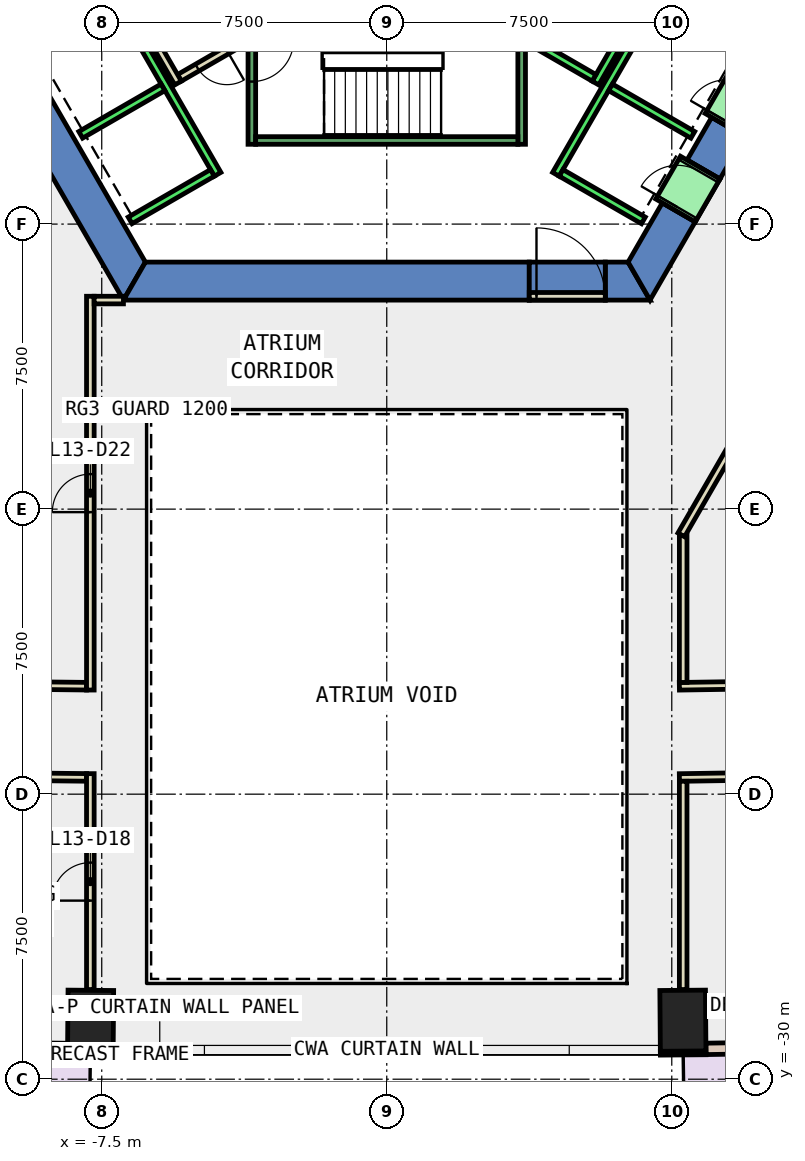
"""IFC4 building model, lengths in metres.
Left out: names, types, materials, properties, quantities, classifications, styles, units other than length and angle.
Written with IfcOpenShell. Run it as: python <this file> out.ifc"""

import sys

from ifc_helpers import new_model, si_unit, direction, frame, frame_2d, origin, origin_2d, place, context, subcontext, project, spatial, polyline, rectangle, outline, extrude, element, fill, save


model = new_model("IFC4")
c1 = context("Model", 3, precision=1e-05, world=origin(), true_north=direction((0.0, 1.0)))
c2 = subcontext(c1, "Body", "Model", "MODEL_VIEW")
j1 = project(units=[si_unit("LENGTHUNIT", "METRE"), si_unit("PLANEANGLEUNIT", "RADIAN")], contexts=[c1])
p1 = place(None, origin())
s1 = spatial("IfcSite", under=j1, at=p1, CompositionType="ELEMENT")
p2 = place(p1, origin())
s2 = spatial("IfcBuilding", under=s1, at=p2, CompositionType="ELEMENT")
p3 = place(p2, frame((0.0, 0.0, 64.4)))
s3 = spatial("IfcBuildingStorey", under=s2, at=p3, CompositionType="ELEMENT", Elevation=64.4)
for number, where, z_axis, x_axis in (
    (1, (-7.793, -28.461, -0.4), (0.0, 0.0, 1.0), (-1.0, 0.008, 0.0)),
    (2, (7.793, -28.461, -0.4), (0.0, 0.0, 1.0), (1.0, 0.008, 0.0)),
):
    element("IfcColumn", number, at=place(p3, frame(where, z_axis=z_axis, x_axis=x_axis)), inside=s3, PredefinedType="COLUMN", context=c2, shape_type="SweptSolid", body=[
        extrude(rectangle(XDim=1.2, YDim=1.6, at=origin_2d()), origin(), (0.0, 0.0, 1.0), 4.2),
    ])
p4 = place(p3, frame((0.0, 0.0, -0.4)))
e3 = element("IfcWall", 3, at=p4, inside=s3, PredefinedType="SHEAR", context=c2, shape_type="SweptSolid", body=[
    extrude(outline(polyline([(-13.856, 2.5), (-6.928, -9.5), (-6.351, -8.5), (-12.702, 2.5), (-13.856, 2.5)])), origin(), (0.0, 0.0, 1.0), 4.2),
])
p5 = place(p3, frame((0.0, 0.0, -0.4)))
e4 = element("IfcWall", 4, at=p5, inside=s3, PredefinedType="SHEAR", context=c2, shape_type="SweptSolid", body=[
    extrude(outline(polyline([(3.75, -9.5), (3.75, -8.5), (-6.351, -8.5), (-6.928, -9.5), (3.75, -9.5)])), origin(), (0.0, 0.0, 1.0), 4.2),
])
p6 = place(p3, frame((0.0, 0.0, -0.4)))
e5 = element("IfcWall", 5, at=p6, inside=s3, PredefinedType="SHEAR", context=c2, shape_type="SweptSolid", body=[
    extrude(outline(polyline([(5.75, -8.5), (5.75, -9.5), (6.928, -9.5), (6.351, -8.5), (5.75, -8.5)])), origin(), (0.0, 0.0, 1.0), 4.2),
])
p7 = place(p3, frame((0.0, 0.0, 3.6)))
e6 = element("IfcWall", 6, at=p7, inside=s3, PredefinedType="SHEAR", context=c2, shape_type="SweptSolid", body=[
    extrude(outline(polyline([(5.75, -9.5), (5.75, -8.5), (3.75, -8.5), (3.75, -9.5), (5.75, -9.5)])), origin(), (0.0, 0.0, 1.0), 0.2),
])
p8 = place(p3, frame((0.0, 0.0, -0.4)))
e7 = element("IfcWall", 7, at=p8, inside=s3, PredefinedType="SHEAR", context=c2, shape_type="SweptSolid", body=[
    extrude(outline(polyline([(8.117, -7.44), (7.252, -6.94), (6.351, -8.5), (6.928, -9.5), (8.117, -7.44)])), origin(), (0.0, 0.0, 1.0), 4.2),
])
p9 = place(p3, frame((0.0, 0.0, -0.4)))
e8 = element("IfcWall", 8, at=p9, inside=s3, PredefinedType="SHEAR", context=c2, shape_type="SweptSolid", body=[
    extrude(outline(polyline([(9.417, -5.189), (8.551, -4.689), (7.902, -5.814), (8.767, -6.314), (9.417, -5.189)])), origin(), (0.0, 0.0, 1.0), 4.2),
])
p10 = place(p3, frame((0.0, 0.0, 3.6)))
e9 = element("IfcWall", 9, at=p10, inside=s3, PredefinedType="SHEAR", context=c2, shape_type="SweptSolid", body=[
    extrude(outline(polyline([(8.767, -6.314), (7.902, -5.814), (7.252, -6.94), (8.117, -7.44), (8.767, -6.314)])), origin(), (0.0, 0.0, 1.0), 0.2),
])
p11 = place(p3, frame((0.0, 0.0, 3.6)))
e10 = element("IfcWall", 10, at=p11, inside=s3, PredefinedType="SHEAR", context=c2, shape_type="SweptSolid", body=[
    extrude(outline(polyline([(10.067, -4.063), (9.201, -3.563), (8.551, -4.689), (9.417, -5.189), (10.067, -4.063)])), origin(), (0.0, 0.0, 1.0), 0.2),
])
for number, where, z_axis, x_axis in (
    (11, (-8.4, -29.306, 0.0), (0.0, 0.0, 1.0), (1.0, -0.008, 0.0)),
    (12, (7.2, -29.316, 0.0), (0.0, 0.0, 1.0), (1.0, 0.008, 0.0)),
):
    element("IfcWall", number, at=place(p3, frame(where, z_axis=z_axis, x_axis=x_axis)), inside=s3, PredefinedType="STANDARD", context=c2, shape_type="SweptSolid", body=[
        extrude(rectangle(XDim=1.2, YDim=0.1, at=frame_2d((0.6, 0.0))), origin(), (0.0, 0.0, 1.0), 3.8),
    ])
p12 = place(p3, frame((-15.568, -29.125, 0.0), z_axis=(0.0, 0.0, 1.0), x_axis=(0.999939152594, -0.011031369316, 0.0)))
e13 = element("IfcWall", 13, at=p12, inside=s3, PredefinedType="STANDARD", context=c2, shape_type="SweptSolid", body=[
    extrude(rectangle(XDim=7.171, YDim=0.3, at=frame_2d((3.585, 0.0))), origin(), (0.0, 0.0, 1.0), 3.8),
])
p13 = place(p12, frame((0.793, 0.0, 0.0)))
e14 = element("IfcOpeningElement", 14, at=p13, cuts=e13, PredefinedType="OPENING", context=c2, shape_type="SweptSolid", body=[
    extrude(rectangle(XDim=2.0, YDim=2.4, at=frame_2d((1.0, 1.2))), frame((0.0, 0.16, 0.0), z_axis=(0.0, -1.0, 0.0), x_axis=(1.0, 0.0, 0.0)), (0.0, 0.0, 1.0), 0.32),
])
p14 = place(p12, frame((4.178, 0.0, 0.9)))
e15 = element("IfcOpeningElement", 15, at=p14, cuts=e13, PredefinedType="OPENING", context=c2, shape_type="SweptSolid", body=[
    extrude(rectangle(XDim=2.4, YDim=2.6, at=frame_2d((1.2, 1.3))), frame((0.0, 0.16, 0.0), z_axis=(0.0, -1.0, 0.0), x_axis=(1.0, 0.0, 0.0)), (0.0, 0.0, 1.0), 0.32),
])
p15 = place(p3, frame((8.398, -29.202, 0.0), z_axis=(0.0, 0.0, 1.0), x_axis=(0.99988053916, 0.015456629942, 0.0)))
e16 = element("IfcWall", 16, at=p15, inside=s3, PredefinedType="STANDARD", context=c2, shape_type="SweptSolid", body=[
    extrude(rectangle(XDim=7.171, YDim=0.3, at=frame_2d((3.585, 0.0))), origin(), (0.0, 0.0, 1.0), 3.8),
])
p16 = place(p15, frame((0.793, 0.0, 0.0)))
e17 = element("IfcOpeningElement", 17, at=p16, cuts=e16, PredefinedType="OPENING", context=c2, shape_type="SweptSolid", body=[
    extrude(rectangle(XDim=2.0, YDim=2.4, at=frame_2d((1.0, 1.2))), frame((0.0, 0.16, 0.0), z_axis=(0.0, -1.0, 0.0), x_axis=(1.0, 0.0, 0.0)), (0.0, 0.0, 1.0), 0.32),
])
p17 = place(p15, frame((4.178, 0.0, 0.9)))
e18 = element("IfcOpeningElement", 18, at=p17, cuts=e16, PredefinedType="OPENING", context=c2, shape_type="SweptSolid", body=[
    extrude(rectangle(XDim=2.4, YDim=2.6, at=frame_2d((1.2, 1.3))), frame((0.0, 0.16, 0.0), z_axis=(0.0, -1.0, 0.0), x_axis=(1.0, 0.0, 0.0)), (0.0, 0.0, 1.0), 0.32),
])
p18 = place(p3, frame((7.7, -19.661, 0.0), z_axis=(0.0, 0.0, 1.0), x_axis=(0.999882138464, 0.015352823245, 0.0)))
e19 = element("IfcWall", 19, at=p18, inside=s3, PredefinedType="PARTITIONING", context=c2, shape_type="SweptSolid", body=[
    extrude(rectangle(XDim=8.269, YDim=0.2, at=frame_2d((4.135, 0.0))), origin(), (0.0, 0.0, 1.0), 3.8),
])
p19 = place(p18, frame((3.235, 0.0, 0.0)))
e20 = element("IfcOpeningElement", 20, at=p19, cuts=e19, PredefinedType="OPENING", context=c2, shape_type="SweptSolid", body=[
    extrude(rectangle(XDim=1.8, YDim=2.1, at=frame_2d((0.9, 1.05))), frame((0.0, 0.11, 0.0), z_axis=(0.0, -1.0, 0.0), x_axis=(1.0, 0.0, 0.0)), (0.0, 0.0, 1.0), 0.22),
])
p20 = place(p3, frame((-9.776, -19.638, 0.0), z_axis=(0.0, 0.0, 1.0), x_axis=(0.999937374473, -0.011191386544, 0.0)))
e21 = element("IfcWall", 21, at=p20, inside=s3, PredefinedType="PARTITIONING", context=c2, shape_type="SweptSolid", body=[
    extrude(rectangle(XDim=1.876, YDim=0.2, at=frame_2d((0.938, 0.0))), origin(), (0.0, 0.0, 1.0), 3.8),
])
p21 = place(p3, frame((16.018, -21.933, 0.0), z_axis=(0.0, 0.0, 1.0), x_axis=(-0.999879942341, -0.015495189738, 0.0)))
e22 = element("IfcWall", 22, at=p21, inside=s3, PredefinedType="PARTITIONING", context=c2, shape_type="SweptSolid", body=[
    extrude(rectangle(XDim=8.319, YDim=0.2, at=frame_2d((4.16, 0.0))), origin(), (0.0, 0.0, 1.0), 3.8),
])
p22 = place(p21, frame((3.66, 0.0, 0.0)))
e23 = element("IfcOpeningElement", 23, at=p22, cuts=e22, PredefinedType="OPENING", context=c2, shape_type="SweptSolid", body=[
    extrude(rectangle(XDim=1.0, YDim=2.1, at=frame_2d((0.5, 1.05))), frame((0.0, 0.11, 0.0), z_axis=(0.0, -1.0, 0.0), x_axis=(1.0, 0.0, 0.0)), (0.0, 0.0, 1.0), 0.22),
])
p23 = place(p3, frame((-7.9, -22.059, 0.0), z_axis=(0.0, 0.0, 1.0), x_axis=(-0.999940210022, 0.010935098606, 0.0)))
e24 = element("IfcWall", 24, at=p23, inside=s3, PredefinedType="PARTITIONING", context=c2, shape_type="SweptSolid", body=[
    extrude(rectangle(XDim=3.929, YDim=0.2, at=frame_2d((1.965, 0.0))), origin(), (0.0, 0.0, 1.0), 3.8),
])
p24 = place(p3, frame((-3.65, -2.61, 0.0), z_axis=(0.0, 0.0, 1.0), x_axis=(-0.866072462134, -0.499918483688, 0.0)))
e25 = element("IfcWall", 25, at=p24, inside=s3, PredefinedType="PARTITIONING", context=c2, shape_type="SweptSolid", body=[
    extrude(rectangle(XDim=2.084, YDim=0.2, at=frame_2d((1.042, 0.0))), origin(), (0.0, 0.0, 1.0), 3.8),
])
p25 = place(p24, frame((0.642, 0.0, 0.0)))
e26 = element("IfcOpeningElement", 26, at=p25, cuts=e25, PredefinedType="OPENING", context=c2, shape_type="SweptSolid", body=[
    extrude(rectangle(XDim=0.9, YDim=2.1, at=frame_2d((0.45, 1.05))), frame((0.0, 0.11, 0.0), z_axis=(0.0, -1.0, 0.0), x_axis=(1.0, 0.0, 0.0)), (0.0, 0.0, 1.0), 0.22),
])
p26 = place(p3, frame((-5.492, -3.788, 0.0), z_axis=(0.0, 0.0, 1.0), x_axis=(-0.500008949224, 0.866020236886, 0.0)))
e27 = element("IfcWall", 27, at=p26, inside=s3, PredefinedType="PARTITIONING", context=c2, shape_type="SweptSolid", body=[
    extrude(rectangle(XDim=2.68, YDim=0.2, at=frame_2d((1.34, 0.0))), origin(), (0.0, 0.0, 1.0), 3.8),
])
p27 = place(p3, frame((7.8, -15.69, 0.0), z_axis=(0.0, 0.0, 1.0), x_axis=(0.0, -1.0, 0.0)))
e28 = element("IfcWall", 28, at=p27, inside=s3, PredefinedType="PARTITIONING", context=c2, shape_type="SweptSolid", body=[
    extrude(rectangle(XDim=3.87, YDim=0.2, at=frame_2d((1.935, 0.0))), origin(), (0.0, 0.0, 1.0), 3.8),
])
p28 = place(p3, frame((-7.8, -19.76, 0.0), z_axis=(0.0, 0.0, 1.0), x_axis=(0.0, 1.0, 0.0)))
e29 = element("IfcWall", 29, at=p28, inside=s3, PredefinedType="PARTITIONING", context=c2, shape_type="SweptSolid", body=[
    extrude(rectangle(XDim=10.361, YDim=0.2, at=frame_2d((5.181, 0.0))), origin(), (0.0, 0.0, 1.0), 3.8),
])
p29 = place(p28, frame((4.681, 0.0, 0.0)))
e30 = element("IfcOpeningElement", 30, at=p29, cuts=e29, PredefinedType="OPENING", context=c2, shape_type="SweptSolid", body=[
    extrude(rectangle(XDim=1.0, YDim=2.1, at=frame_2d((0.5, 1.05))), frame((0.0, 0.11, 0.0), z_axis=(0.0, -1.0, 0.0), x_axis=(1.0, 0.0, 0.0)), (0.0, 0.0, 1.0), 0.22),
])
p30 = place(p3, frame((-7.7, -9.499, 0.0), z_axis=(0.0, 0.0, 1.0), x_axis=(1.0, 0.0, 0.0)))
e31 = element("IfcWall", 31, at=p30, inside=s3, PredefinedType="PARTITIONING", context=c2, shape_type="SweptSolid", body=[
    extrude(rectangle(XDim=0.771, YDim=0.2, at=frame_2d((0.385, 0.0))), origin(), (0.0, 0.0, 1.0), 3.8),
])
p31 = place(p3, frame((7.8, -22.16, 0.0), z_axis=(0.0, 0.0, 1.0), x_axis=(0.0, -1.0, 0.0)))
e32 = element("IfcWall", 32, at=p31, inside=s3, PredefinedType="PARTITIONING", context=c2, shape_type="SweptSolid", body=[
    extrude(rectangle(XDim=5.481, YDim=0.2, at=frame_2d((2.741, 0.0))), origin(), (0.0, 0.0, 1.0), 3.8),
])
p32 = place(p3, frame((-7.8, -27.641, 0.0), z_axis=(0.0, 0.0, 1.0), x_axis=(0.0, 1.0, 0.0)))
e33 = element("IfcWall", 33, at=p32, inside=s3, PredefinedType="PARTITIONING", context=c2, shape_type="SweptSolid", body=[
    extrude(rectangle(XDim=5.681, YDim=0.2, at=frame_2d((2.841, 0.0))), origin(), (0.0, 0.0, 1.0), 3.8),
])
p33 = place(p32, frame((2.34, 0.0, 0.0)))
e34 = element("IfcOpeningElement", 34, at=p33, cuts=e33, PredefinedType="OPENING", context=c2, shape_type="SweptSolid", body=[
    extrude(rectangle(XDim=1.0, YDim=2.1, at=frame_2d((0.5, 1.05))), frame((0.0, 0.11, 0.0), z_axis=(0.0, -1.0, 0.0), x_axis=(1.0, 0.0, 0.0)), (0.0, 0.0, 1.0), 0.22),
])
p34 = place(p3, frame((3.75, -9.4, 0.0), z_axis=(0.0, 0.0, 1.0), x_axis=(1.0, 0.0, 0.0)))
e35 = element("IfcWall", 35, at=p34, inside=s3, PredefinedType="PARTITIONING", context=c2, shape_type="SweptSolid", body=[
    extrude(rectangle(XDim=2.0, YDim=0.2, at=frame_2d((1.0, 0.0))), origin(), (0.0, 0.0, 1.0), 2.4),
])
p35 = place(p34, frame((0.19, 0.0, 0.0)))
e36 = element("IfcOpeningElement", 36, at=p35, cuts=e35, PredefinedType="OPENING", context=c2, shape_type="SweptSolid", body=[
    extrude(rectangle(XDim=1.8, YDim=2.1, at=frame_2d((0.9, 1.05))), frame((0.0, 0.11, 0.0), z_axis=(0.0, -1.0, 0.0), x_axis=(1.0, 0.0, 0.0)), (0.0, 0.0, 1.0), 0.22),
])
p36 = place(p3, frame((12.401, -7.622, 0.0), z_axis=(0.0, 0.0, 1.0), x_axis=(-0.500029185841, -0.866008552675, 0.0)))
e37 = element("IfcWall", 37, at=p36, inside=s3, PredefinedType="PARTITIONING", context=c2, shape_type="SweptSolid", body=[
    extrude(rectangle(XDim=9.301, YDim=0.2, at=frame_2d((4.651, 0.0))), origin(), (0.0, 0.0, 1.0), 3.8),
])
p37 = place(p3, frame((-9.751, 2.99, 0.0), z_axis=(0.0, 0.0, 1.0), x_axis=(0.50000090737, -0.866024879913, 0.0)))
e38 = element("IfcWall", 38, at=p37, inside=s3, PredefinedType="STANDARD", context=c2, shape_type="SweptSolid", body=[
    extrude(rectangle(XDim=10.6, YDim=0.2, at=frame_2d((5.3, 0.0))), origin(), (0.0, 0.0, 1.0), 3.8),
])
for number, where, z_axis, x_axis in (
    (39, (-5.888, -3.902, 0.0), (0.0, 0.0, 1.0), (-0.866, -0.5, 0.0)),
    (40, (-4.588, -6.153, 0.0), (0.0, 0.0, 1.0), (-0.866, -0.5, 0.0)),
):
    element("IfcWall", number, at=place(p3, frame(where, z_axis=z_axis, x_axis=x_axis)), inside=s3, PredefinedType="STANDARD", context=c2, shape_type="SweptSolid", body=[
        extrude(rectangle(XDim=2.5, YDim=0.2, at=frame_2d((1.25, 0.0))), origin(), (0.0, 0.0, 1.0), 3.8),
    ])
p38 = place(p3, frame((5.492, -3.788, 0.0), z_axis=(0.0, 0.0, 1.0), x_axis=(0.500011755427, 0.866018616679, 0.0)))
e41 = element("IfcWall", 41, at=p38, inside=s3, PredefinedType="STANDARD", context=c2, shape_type="SweptSolid", body=[
    extrude(rectangle(XDim=2.8, YDim=0.2, at=frame_2d((1.4, 0.0))), origin(), (0.0, 0.0, 1.0), 3.8),
])
p39 = place(p3, frame((3.377, -2.452, 0.0), z_axis=(0.0, 0.0, 1.0), x_axis=(0.865955154139, -0.50012165622, 0.0)))
e42 = element("IfcWall", 42, at=p39, inside=s3, PredefinedType="STANDARD", context=c2, shape_type="SweptSolid", body=[
    extrude(rectangle(XDim=2.4, YDim=0.2, at=frame_2d((1.2, 0.0))), origin(), (0.0, 0.0, 1.0), 3.8),
])
p40 = place(p3, frame((4.451, -6.19, 0.0), z_axis=(0.0, 0.0, 1.0), x_axis=(0.50000090737, 0.866024879913, 0.0)))
e43 = element("IfcWall", 43, at=p40, inside=s3, PredefinedType="STANDARD", context=c2, shape_type="SweptSolid", body=[
    extrude(rectangle(XDim=10.6, YDim=0.2, at=frame_2d((5.3, 0.0))), origin(), (0.0, 0.0, 1.0), 3.8),
])
for number, where, z_axis, x_axis in (
    (44, (4.588, -6.153, 0.0), (0.0, 0.0, 1.0), (0.866, -0.5, 0.0)),
    (45, (5.888, -3.902, 0.0), (0.0, 0.0, 1.0), (0.866, -0.5, 0.0)),
):
    element("IfcWall", number, at=place(p3, frame(where, z_axis=z_axis, x_axis=x_axis)), inside=s3, PredefinedType="STANDARD", context=c2, shape_type="SweptSolid", body=[
        extrude(rectangle(XDim=2.5, YDim=0.2, at=frame_2d((1.25, 0.0))), origin(), (0.0, 0.0, 1.0), 3.8),
    ])
p41 = place(p3, frame((7.598, -7.14, 0.0), z_axis=(0.0, 0.0, 1.0), x_axis=(0.500362116554, 0.865816234728, 0.0)))
e46 = element("IfcWall", 46, at=p41, inside=s3, PredefinedType="STANDARD", context=c2, shape_type="SweptSolid", body=[
    extrude(rectangle(XDim=1.299, YDim=1.2, at=frame_2d((0.65, 0.0))), origin(), (0.0, 0.0, 1.0), 2.4),
])
p42 = place(p41, frame((0.1, 0.0, 0.0)))
e47 = element("IfcOpeningElement", 47, at=p42, cuts=e46, PredefinedType="OPENING", context=c2, shape_type="SweptSolid", body=[
    extrude(rectangle(XDim=1.1, YDim=2.3, at=frame_2d((0.55, 1.15))), frame((0.0, 0.61, 0.0), z_axis=(0.0, -1.0, 0.0), x_axis=(1.0, 0.0, 0.0)), (0.0, 0.0, 1.0), 1.22),
])
p43 = place(p3, frame((8.898, -4.889, 0.0), z_axis=(0.0, 0.0, 1.0), x_axis=(0.500036693733, 0.866004217611, 0.0)))
e48 = element("IfcWall", 48, at=p43, inside=s3, PredefinedType="STANDARD", context=c2, shape_type="SweptSolid", body=[
    extrude(rectangle(XDim=1.3, YDim=1.2, at=frame_2d((0.65, 0.0))), origin(), (0.0, 0.0, 1.0), 2.4),
])
p44 = place(p43, frame((0.1, 0.0, 0.0)))
e49 = element("IfcOpeningElement", 49, at=p44, cuts=e48, PredefinedType="OPENING", context=c2, shape_type="SweptSolid", body=[
    extrude(rectangle(XDim=1.1, YDim=2.3, at=frame_2d((0.55, 1.15))), frame((0.0, 0.61, 0.0), z_axis=(0.0, -1.0, 0.0), x_axis=(1.0, 0.0, 0.0)), (0.0, 0.0, 1.0), 1.22),
])
p45 = place(p3, frame((-3.55, -1.0, 0.0), z_axis=(0.0, 0.0, 1.0), x_axis=(0.0, -1.0, 0.0)))
e50 = element("IfcWall", 50, at=p45, inside=s3, PredefinedType="STANDARD", context=c2, shape_type="SweptSolid", body=[
    extrude(rectangle(XDim=4.4, YDim=0.2, at=frame_2d((2.2, 0.0))), origin(), (0.0, 0.0, 1.0), 3.8),
])
p46 = place(p45, frame((1.65, 0.0, 0.0)))
e51 = element("IfcOpeningElement", 51, at=p46, cuts=e50, PredefinedType="OPENING", context=c2, shape_type="SweptSolid", body=[
    extrude(rectangle(XDim=1.1, YDim=2.2, at=frame_2d((0.55, 1.1))), frame((0.0, 0.11, 0.0), z_axis=(0.0, -1.0, 0.0), x_axis=(1.0, 0.0, 0.0)), (0.0, 0.0, 1.0), 0.22),
])
p47 = place(p3, frame((3.55, -2.667, 0.0), z_axis=(0.0, 0.0, 1.0), x_axis=(0.0, -1.0, 0.0)))
e52 = element("IfcWall", 52, at=p47, inside=s3, PredefinedType="STANDARD", context=c2, shape_type="SweptSolid", body=[
    extrude(rectangle(XDim=2.733, YDim=0.2, at=frame_2d((1.366, 0.0))), origin(), (0.0, 0.0, 1.0), 3.8),
])
p48 = place(p3, frame((-3.45, -5.3, 0.0), z_axis=(0.0, 0.0, 1.0), x_axis=(1.0, 0.0, 0.0)))
e53 = element("IfcWall", 53, at=p48, inside=s3, PredefinedType="STANDARD", context=c2, shape_type="SweptSolid", body=[
    extrude(rectangle(XDim=6.9, YDim=0.2, at=frame_2d((3.45, 0.0))), origin(), (0.0, 0.0, 1.0), 3.8),
])
p49 = place(p33, origin())
e54 = element("IfcDoor", 54, at=p49, inside=s3, OperationType="SINGLE_SWING_LEFT", PredefinedType="DOOR", context=c2, shape_type="SweptSolid", body=[
    extrude(rectangle(XDim=1.0, YDim=2.1, at=frame_2d((0.5, 1.05))), frame((0.0, 0.025, 0.0), z_axis=(0.0, -1.0, 0.0), x_axis=(1.0, 0.0, 0.0)), (0.0, 0.0, 1.0), 0.05),
])
fill(e34, e54)
p50 = place(p29, origin())
e55 = element("IfcDoor", 55, at=p50, inside=s3, OperationType="SINGLE_SWING_LEFT", PredefinedType="DOOR", context=c2, shape_type="SweptSolid", body=[
    extrude(rectangle(XDim=1.0, YDim=2.1, at=frame_2d((0.5, 1.05))), frame((0.0, 0.025, 0.0), z_axis=(0.0, -1.0, 0.0), x_axis=(1.0, 0.0, 0.0)), (0.0, 0.0, 1.0), 0.05),
])
fill(e30, e55)
p51 = place(p25, origin())
e56 = element("IfcDoor", 56, at=p51, inside=s3, OperationType="SINGLE_SWING_LEFT", PredefinedType="DOOR", context=c2, shape_type="SweptSolid", body=[
    extrude(rectangle(XDim=0.9, YDim=2.1, at=frame_2d((0.45, 1.05))), frame((0.0, 0.025, 0.0), z_axis=(0.0, -1.0, 0.0), x_axis=(1.0, 0.0, 0.0)), (0.0, 0.0, 1.0), 0.05),
])
fill(e26, e56)
p52 = place(p35, origin())
e57 = element("IfcDoor", 57, at=p52, inside=s3, OperationType="DOUBLE_DOOR_SINGLE_SWING", PredefinedType="DOOR", context=c2, shape_type="SweptSolid", body=[
    extrude(rectangle(XDim=1.8, YDim=2.1, at=frame_2d((0.9, 1.05))), frame((0.0, 0.025, 0.0), z_axis=(0.0, -1.0, 0.0), x_axis=(1.0, 0.0, 0.0)), (0.0, 0.0, 1.0), 0.05),
])
fill(e36, e57)
p53 = place(p42, origin())
e58 = element("IfcDoor", 58, at=p53, inside=s3, OperationType="SLIDING_TO_LEFT", PredefinedType="DOOR", context=c2, shape_type="SweptSolid", body=[
    extrude(rectangle(XDim=1.1, YDim=2.3, at=frame_2d((0.55, 1.15))), frame((0.0, 0.025, 0.0), z_axis=(0.0, -1.0, 0.0), x_axis=(1.0, 0.0, 0.0)), (0.0, 0.0, 1.0), 0.05),
])
fill(e47, e58)
p54 = place(p46, origin())
e59 = element("IfcDoor", 59, at=p54, inside=s3, OperationType="SINGLE_SWING_LEFT", PredefinedType="DOOR", context=c2, shape_type="SweptSolid", body=[
    extrude(rectangle(XDim=1.1, YDim=2.2, at=frame_2d((0.55, 1.1))), frame((0.0, 0.025, 0.0), z_axis=(0.0, -1.0, 0.0), x_axis=(1.0, 0.0, 0.0)), (0.0, 0.0, 1.0), 0.05),
])
fill(e51, e59)
save(model, sys.argv[1])
